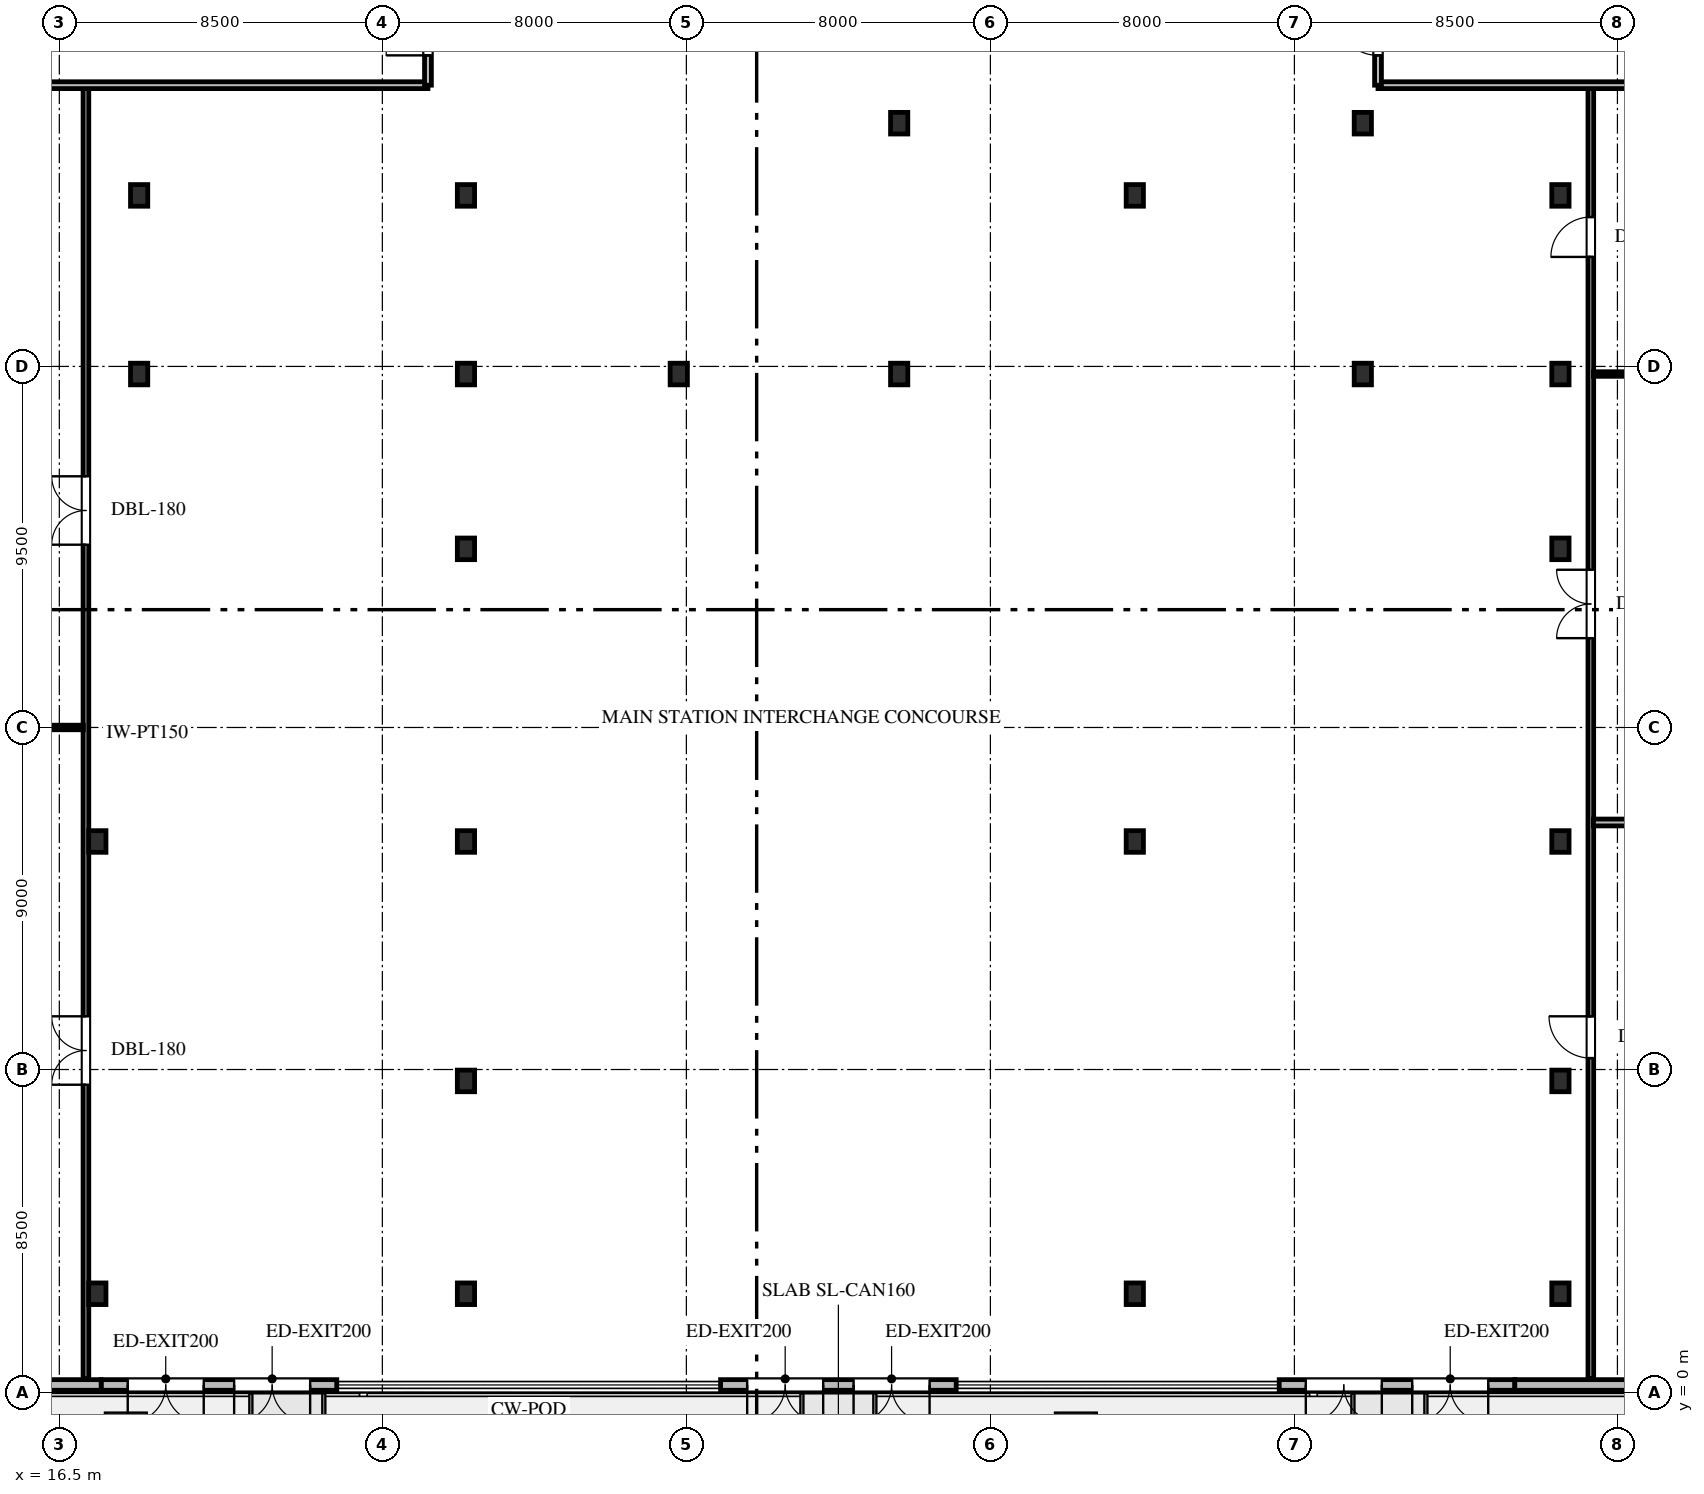
"""IFC4 building model, lengths in metres.
Left out: names, types, materials, properties, quantities, classifications, styles, units other than length and angle.
Written with IfcOpenShell. Run it as: python <this file> out.ifc"""

import sys

from ifc_helpers import new_model, si_unit, direction, frame, frame_2d, origin, origin_2d, place, context, subcontext, project, spatial, rectangle, i_section, extrude, element, fill, save


model = new_model("IFC4")
c1 = context("Model", 3, precision=1e-05, world=origin(), true_north=direction((0.0, 1.0)))
c2 = subcontext(c1, "Body", "Model", "MODEL_VIEW")
j1 = project(units=[si_unit("LENGTHUNIT", "METRE"), si_unit("PLANEANGLEUNIT", "RADIAN")], contexts=[c1])
p1 = place(None, origin())
s1 = spatial("IfcSite", under=j1, at=p1, CompositionType="ELEMENT")
p2 = place(p1, origin())
s2 = spatial("IfcBuilding", under=s1, at=p2, CompositionType="ELEMENT")
p3 = place(p2, origin())
s3 = spatial("IfcBuildingStorey", under=s2, at=p3, CompositionType="ELEMENT", Elevation=0.0)
for number, where, z_axis, x_axis in (
    (1, (17.5, 2.6, 0.0), (0.0, 0.0, 1.0), (1.0, 0.0, 0.0)),
    (2, (27.2, 2.6, 0.0), (0.0, 0.0, 1.0), (1.0, 0.0, 0.0)),
    (3, (44.8, 2.6, 0.0), (0.0, 0.0, 1.0), (1.0, 0.0, 0.0)),
    (4, (56.0, 2.6, 0.0), (0.0, 0.0, 1.0), (1.0, 0.0, 0.0)),
    (5, (27.2, 8.2, 0.0), (0.0, 0.0, 1.0), (1.0, 0.0, 0.0)),
    (6, (56.0, 8.2, 0.0), (0.0, 0.0, 1.0), (1.0, 0.0, 0.0)),
    (7, (17.5, 14.5, 0.0), (0.0, 0.0, 1.0), (1.0, 0.0, 0.0)),
    (8, (27.2, 14.5, 0.0), (0.0, 0.0, 1.0), (1.0, 0.0, 0.0)),
    (9, (44.8, 14.5, 0.0), (0.0, 0.0, 1.0), (1.0, 0.0, 0.0)),
    (10, (56.0, 14.5, 0.0), (0.0, 0.0, 1.0), (1.0, 0.0, 0.0)),
    (11, (27.2, 22.2, 0.0), (0.0, 0.0, 1.0), (1.0, 0.0, 0.0)),
    (12, (56.0, 22.2, 0.0), (0.0, 0.0, 1.0), (1.0, 0.0, 0.0)),
    (13, (18.6, 26.8, 0.0), (0.0, 0.0, 1.0), (1.0, 0.0, 0.0)),
    (14, (27.2, 26.8, 0.0), (0.0, 0.0, 1.0), (1.0, 0.0, 0.0)),
    (15, (32.8, 26.8, 0.0), (0.0, 0.0, 1.0), (1.0, 0.0, 0.0)),
    (16, (38.6, 26.8, 0.0), (0.0, 0.0, 1.0), (1.0, 0.0, 0.0)),
    (17, (50.8, 26.8, 0.0), (0.0, 0.0, 1.0), (1.0, 0.0, 0.0)),
    (18, (56.0, 26.8, 0.0), (0.0, 0.0, 1.0), (1.0, 0.0, 0.0)),
    (19, (18.6, 31.5, 0.0), (0.0, 0.0, 1.0), (1.0, 0.0, 0.0)),
    (20, (27.2, 31.5, 0.0), (0.0, 0.0, 1.0), (1.0, 0.0, 0.0)),
    (21, (44.8, 31.5, 0.0), (0.0, 0.0, 1.0), (1.0, 0.0, 0.0)),
    (22, (56.0, 31.5, 0.0), (0.0, 0.0, 1.0), (1.0, 0.0, 0.0)),
    (23, (38.6, 33.4, 0.0), (0.0, 0.0, 1.0), (1.0, 0.0, 0.0)),
    (24, (50.8, 33.4, 0.0), (0.0, 0.0, 1.0), (1.0, 0.0, 0.0)),
):
    element("IfcColumn", number, at=place(p3, frame(where, z_axis=z_axis, x_axis=x_axis)), inside=s3, PredefinedType="COLUMN", context=c2, shape_type="SweptSolid", body=[
        extrude(i_section(OverallWidth=0.454, OverallDepth=0.569, WebThickness=0.078, FlangeThickness=0.125, FilletRadius=0.03, at=origin_2d()), origin(), (0.0, 0.0, 1.0), 5.4),
    ])
p4 = place(p3, frame((23.8, 0.2, 0.0), z_axis=(0.0, 0.0, 1.0), x_axis=(-1.0, 0.0, 0.0)))
e25 = element("IfcWall", 25, at=p4, inside=s3, PredefinedType="STANDARD", context=c2, shape_type="SweptSolid", body=[
    extrude(rectangle(XDim=6.2, YDim=0.28, at=frame_2d((3.1, 0.0))), origin(), (0.0, 0.0, 1.0), 5.13),
])
p5 = place(p4, frame((0.7, 0.0, 0.0)))
e26 = element("IfcOpeningElement", 26, at=p5, cuts=e25, PredefinedType="OPENING", context=c2, shape_type="SweptSolid", body=[
    extrude(rectangle(XDim=2.0, YDim=2.4, at=frame_2d((1.0, 1.2))), frame((0.0, 0.15, 0.0), z_axis=(0.0, -1.0, 0.0), x_axis=(1.0, 0.0, 0.0)), (0.0, 0.0, 1.0), 0.3),
])
p6 = place(p4, frame((3.5, 0.0, 0.0)))
e27 = element("IfcOpeningElement", 27, at=p6, cuts=e25, PredefinedType="OPENING", context=c2, shape_type="SweptSolid", body=[
    extrude(rectangle(XDim=2.0, YDim=2.4, at=frame_2d((1.0, 1.2))), frame((0.0, 0.15, 0.0), z_axis=(0.0, -1.0, 0.0), x_axis=(1.0, 0.0, 0.0)), (0.0, 0.0, 1.0), 0.3),
])
p7 = place(p3, frame((40.1, 0.2, 0.0), z_axis=(0.0, 0.0, 1.0), x_axis=(-1.0, 0.0, 0.0)))
e28 = element("IfcWall", 28, at=p7, inside=s3, PredefinedType="STANDARD", context=c2, shape_type="SweptSolid", body=[
    extrude(rectangle(XDim=6.2, YDim=0.28, at=frame_2d((3.1, 0.0))), origin(), (0.0, 0.0, 1.0), 5.13),
])
p8 = place(p7, frame((0.7, 0.0, 0.0)))
e29 = element("IfcOpeningElement", 29, at=p8, cuts=e28, PredefinedType="OPENING", context=c2, shape_type="SweptSolid", body=[
    extrude(rectangle(XDim=2.0, YDim=2.4, at=frame_2d((1.0, 1.2))), frame((0.0, 0.15, 0.0), z_axis=(0.0, -1.0, 0.0), x_axis=(1.0, 0.0, 0.0)), (0.0, 0.0, 1.0), 0.3),
])
p9 = place(p7, frame((3.5, 0.0, 0.0)))
e30 = element("IfcOpeningElement", 30, at=p9, cuts=e28, PredefinedType="OPENING", context=c2, shape_type="SweptSolid", body=[
    extrude(rectangle(XDim=2.0, YDim=2.4, at=frame_2d((1.0, 1.2))), frame((0.0, 0.15, 0.0), z_axis=(0.0, -1.0, 0.0), x_axis=(1.0, 0.0, 0.0)), (0.0, 0.0, 1.0), 0.3),
])
p10 = place(p3, frame((54.8, 0.2, 0.0), z_axis=(0.0, 0.0, 1.0), x_axis=(-1.0, 0.0, 0.0)))
e31 = element("IfcWall", 31, at=p10, inside=s3, PredefinedType="STANDARD", context=c2, shape_type="SweptSolid", body=[
    extrude(rectangle(XDim=6.2, YDim=0.28, at=frame_2d((3.1, 0.0))), origin(), (0.0, 0.0, 1.0), 5.13),
])
p11 = place(p10, frame((0.7, 0.0, 0.0)))
e32 = element("IfcOpeningElement", 32, at=p11, cuts=e31, PredefinedType="OPENING", context=c2, shape_type="SweptSolid", body=[
    extrude(rectangle(XDim=2.0, YDim=2.4, at=frame_2d((1.0, 1.2))), frame((0.0, 0.15, 0.0), z_axis=(0.0, -1.0, 0.0), x_axis=(1.0, 0.0, 0.0)), (0.0, 0.0, 1.0), 0.3),
])
p12 = place(p10, frame((3.5, 0.0, 0.0)))
e33 = element("IfcOpeningElement", 33, at=p12, cuts=e31, PredefinedType="OPENING", context=c2, shape_type="SweptSolid", body=[
    extrude(rectangle(XDim=2.0, YDim=2.4, at=frame_2d((1.0, 1.2))), frame((0.0, 0.15, 0.0), z_axis=(0.0, -1.0, 0.0), x_axis=(1.0, 0.0, 0.0)), (0.0, 0.0, 1.0), 0.3),
])
p13 = place(p3, frame((17.6, 0.2, 0.0), z_axis=(0.0, 0.0, 1.0), x_axis=(-1.0, 0.0, 0.0)))
e34 = element("IfcWall", 34, at=p13, inside=s3, PredefinedType="STANDARD", context=c2, shape_type="SweptSolid", body=[
    extrude(rectangle(XDim=1.6, YDim=0.28, at=frame_2d((0.8, 0.0))), origin(), (0.0, 0.0, 1.0), 5.13),
])
p14 = place(p3, frame((57.8, 0.2, 0.0), z_axis=(0.0, 0.0, 1.0), x_axis=(-1.0, 0.0, 0.0)))
e35 = element("IfcWall", 35, at=p14, inside=s3, PredefinedType="STANDARD", context=c2, shape_type="SweptSolid", body=[
    extrude(rectangle(XDim=3.0, YDim=0.28, at=frame_2d((1.5, 0.0))), origin(), (0.0, 0.0, 1.0), 5.13),
])
p15 = place(p3, frame((17.2, 0.365, 0.0), z_axis=(0.0, 0.0, 1.0), x_axis=(0.0, 1.0, 0.0)))
e36 = element("IfcWall", 36, at=p15, inside=s3, PredefinedType="PARTITIONING", context=c2, shape_type="SweptSolid", body=[
    extrude(rectangle(XDim=33.967, YDim=0.15, at=frame_2d((16.983, 0.0))), origin(), (0.0, 0.0, 1.0), 4.182),
])
p16 = place(p15, frame((7.735, 0.0, 0.0)))
e37 = element("IfcOpeningElement", 37, at=p16, cuts=e36, PredefinedType="OPENING", context=c2, shape_type="SweptSolid", body=[
    extrude(rectangle(XDim=1.8, YDim=2.2, at=frame_2d((0.9, 1.1))), frame((0.0, 0.085, 0.0), z_axis=(0.0, -1.0, 0.0), x_axis=(1.0, 0.0, 0.0)), (0.0, 0.0, 1.0), 0.17),
])
p17 = place(p15, frame((21.944, 0.0, 0.0)))
e38 = element("IfcOpeningElement", 38, at=p17, cuts=e36, PredefinedType="OPENING", context=c2, shape_type="SweptSolid", body=[
    extrude(rectangle(XDim=1.8, YDim=2.2, at=frame_2d((0.9, 1.1))), frame((0.0, 0.085, 0.0), z_axis=(0.0, -1.0, 0.0), x_axis=(1.0, 0.0, 0.0)), (0.0, 0.0, 1.0), 0.17),
])
p18 = place(p3, frame((56.8, 0.365, 0.0), z_axis=(0.0, 0.0, 1.0), x_axis=(0.0, 1.0, 0.0)))
e39 = element("IfcWall", 39, at=p18, inside=s3, PredefinedType="PARTITIONING", context=c2, shape_type="SweptSolid", body=[
    extrude(rectangle(XDim=33.967, YDim=0.15, at=frame_2d((16.983, 0.0))), origin(), (0.0, 0.0, 1.0), 4.182),
])
p19 = place(p18, frame((8.435, 0.0, 0.0)))
e40 = element("IfcOpeningElement", 40, at=p19, cuts=e39, PredefinedType="OPENING", context=c2, shape_type="SweptSolid", body=[
    extrude(rectangle(XDim=1.1, YDim=2.2, at=frame_2d((0.55, 1.1))), frame((0.0, 0.085, 0.0), z_axis=(0.0, -1.0, 0.0), x_axis=(1.0, 0.0, 0.0)), (0.0, 0.0, 1.0), 0.17),
])
p20 = place(p18, frame((19.485, 0.0, 0.0)))
e41 = element("IfcOpeningElement", 41, at=p20, cuts=e39, PredefinedType="OPENING", context=c2, shape_type="SweptSolid", body=[
    extrude(rectangle(XDim=1.8, YDim=2.2, at=frame_2d((0.9, 1.1))), frame((0.0, 0.085, 0.0), z_axis=(0.0, -1.0, 0.0), x_axis=(1.0, 0.0, 0.0)), (0.0, 0.0, 1.0), 0.17),
])
p21 = place(p18, frame((29.516, 0.0, 0.0)))
e42 = element("IfcOpeningElement", 42, at=p21, cuts=e39, PredefinedType="OPENING", context=c2, shape_type="SweptSolid", body=[
    extrude(rectangle(XDim=1.05, YDim=2.2, at=frame_2d((0.525, 1.1))), frame((0.0, 0.085, 0.0), z_axis=(0.0, -1.0, 0.0), x_axis=(1.0, 0.0, 0.0)), (0.0, 0.0, 1.0), 0.17),
])
p22 = place(p3, frame((8.0, 17.5, 0.0), z_axis=(0.0, 0.0, 1.0), x_axis=(1.0, 0.0, 0.0)))
e43 = element("IfcWall", 43, at=p22, inside=s3, PredefinedType="PARTITIONING", context=c2, shape_type="SweptSolid", body=[
    extrude(rectangle(XDim=9.132, YDim=0.12, at=frame_2d((4.566, 0.0))), origin(), (0.0, 0.0, 1.0), 4.182),
])
p23 = place(p3, frame((56.868, 15.0, 0.0), z_axis=(0.0, 0.0, 1.0), x_axis=(1.0, 0.0, 0.0)))
e44 = element("IfcWall", 44, at=p23, inside=s3, PredefinedType="STANDARD", context=c2, shape_type="SweptSolid", body=[
    extrude(rectangle(XDim=16.932, YDim=0.18, at=frame_2d((8.466, 0.0))), origin(), (0.0, 0.0, 1.0), 4.182),
])
p24 = place(p3, frame((56.868, 26.8, 0.0), z_axis=(0.0, 0.0, 1.0), x_axis=(1.0, 0.0, 0.0)))
e45 = element("IfcWall", 45, at=p24, inside=s3, PredefinedType="PARTITIONING", context=c2, shape_type="SweptSolid", body=[
    extrude(rectangle(XDim=16.932, YDim=0.12, at=frame_2d((8.466, 0.0))), origin(), (0.0, 0.0, 1.0), 4.182),
])
p25 = place(p3, frame((51.2, 34.4, 0.0), z_axis=(0.0, 0.0, 1.0), x_axis=(1.0, 0.0, 0.0)))
e46 = element("IfcWall", 46, at=p25, inside=s3, PredefinedType="STANDARD", context=c2, shape_type="SweptSolid", body=[
    extrude(rectangle(XDim=22.435, YDim=0.18, at=frame_2d((11.218, 0.0))), origin(), (0.0, 0.0, 1.0), 4.182),
])
p26 = place(p3, frame((51.2, 34.4, 0.0), z_axis=(0.0, 0.0, 1.0), x_axis=(0.0, 1.0, 0.0)))
e47 = element("IfcWall", 47, at=p26, inside=s3, PredefinedType="STANDARD", context=c2, shape_type="SweptSolid", body=[
    extrude(rectangle(XDim=3.167, YDim=0.18, at=frame_2d((1.583, 0.0))), origin(), (0.0, 0.0, 1.0), 4.823),
])
p27 = place(p26, frame((0.785, 0.0, 0.0)))
e48 = element("IfcOpeningElement", 48, at=p27, cuts=e47, PredefinedType="OPENING", context=c2, shape_type="SweptSolid", body=[
    extrude(rectangle(XDim=1.1, YDim=2.2, at=frame_2d((0.55, 1.1))), frame((0.0, 0.1, 0.0), z_axis=(0.0, -1.0, 0.0), x_axis=(1.0, 0.0, 0.0)), (0.0, 0.0, 1.0), 0.2),
])
p28 = place(p3, frame((8.0, 34.4, 0.0), z_axis=(0.0, 0.0, 1.0), x_axis=(1.0, 0.0, 0.0)))
e49 = element("IfcWall", 49, at=p28, inside=s3, PredefinedType="STANDARD", context=c2, shape_type="SweptSolid", body=[
    extrude(rectangle(XDim=18.2, YDim=0.18, at=frame_2d((9.1, 0.0))), origin(), (0.0, 0.0, 1.0), 4.182),
])
p29 = place(p3, frame((26.2, 34.4, 0.0), z_axis=(0.0, 0.0, 1.0), x_axis=(0.0, 1.0, 0.0)))
e50 = element("IfcWall", 50, at=p29, inside=s3, PredefinedType="STANDARD", context=c2, shape_type="SweptSolid", body=[
    extrude(rectangle(XDim=3.167, YDim=0.18, at=frame_2d((1.583, 0.0))), origin(), (0.0, 0.0, 1.0), 4.182),
])
p30 = place(p29, frame((0.785, 0.0, 0.0)))
e51 = element("IfcOpeningElement", 51, at=p30, cuts=e50, PredefinedType="OPENING", context=c2, shape_type="SweptSolid", body=[
    extrude(rectangle(XDim=1.1, YDim=2.2, at=frame_2d((0.55, 1.1))), frame((0.0, 0.1, 0.0), z_axis=(0.0, -1.0, 0.0), x_axis=(1.0, 0.0, 0.0)), (0.0, 0.0, 1.0), 0.2),
])
p31 = place(p3, frame((0.0, 0.0, 4.6)))
p32 = place(p31, frame((18.25, -1.08, 0.0)))
p33 = place(p32, frame((0.0, 0.0, 0.11)))
e52 = element("IfcDoor", 52, at=p33, inside=s3, OperationType="SINGLE_SWING_LEFT", PredefinedType="TRAPDOOR", context=c2, shape_type="SweptSolid", body=[
    extrude(rectangle(XDim=1.1, YDim=1.1, at=origin_2d()), origin(), (0.0, 0.0, 1.0), 0.05),
])
p34 = place(p31, frame((43.25, -1.08, 0.0)))
p35 = place(p34, frame((0.0, 0.0, 0.11)))
e53 = element("IfcDoor", 53, at=p35, inside=s3, OperationType="SINGLE_SWING_LEFT", PredefinedType="TRAPDOOR", context=c2, shape_type="SweptSolid", body=[
    extrude(rectangle(XDim=1.1, YDim=1.1, at=origin_2d()), origin(), (0.0, 0.0, 1.0), 0.05),
])
p36 = place(p5, origin())
e54 = element("IfcDoor", 54, at=p36, inside=s3, OperationType="DOUBLE_DOOR_SINGLE_SWING", PredefinedType="DOOR", context=c2, shape_type="SweptSolid", body=[
    extrude(rectangle(XDim=2.0, YDim=2.4, at=frame_2d((1.0, 1.2))), frame((0.0, 0.025, 0.0), z_axis=(0.0, -1.0, 0.0), x_axis=(1.0, 0.0, 0.0)), (0.0, 0.0, 1.0), 0.05),
])
fill(e26, e54)
p37 = place(p6, origin())
e55 = element("IfcDoor", 55, at=p37, inside=s3, OperationType="DOUBLE_DOOR_SINGLE_SWING", PredefinedType="DOOR", context=c2, shape_type="SweptSolid", body=[
    extrude(rectangle(XDim=2.0, YDim=2.4, at=frame_2d((1.0, 1.2))), frame((0.0, 0.025, 0.0), z_axis=(0.0, -1.0, 0.0), x_axis=(1.0, 0.0, 0.0)), (0.0, 0.0, 1.0), 0.05),
])
fill(e27, e55)
p38 = place(p8, origin())
e56 = element("IfcDoor", 56, at=p38, inside=s3, OperationType="DOUBLE_DOOR_SINGLE_SWING", PredefinedType="DOOR", context=c2, shape_type="SweptSolid", body=[
    extrude(rectangle(XDim=2.0, YDim=2.4, at=frame_2d((1.0, 1.2))), frame((0.0, 0.025, 0.0), z_axis=(0.0, -1.0, 0.0), x_axis=(1.0, 0.0, 0.0)), (0.0, 0.0, 1.0), 0.05),
])
fill(e29, e56)
p39 = place(p9, origin())
e57 = element("IfcDoor", 57, at=p39, inside=s3, OperationType="DOUBLE_DOOR_SINGLE_SWING", PredefinedType="DOOR", context=c2, shape_type="SweptSolid", body=[
    extrude(rectangle(XDim=2.0, YDim=2.4, at=frame_2d((1.0, 1.2))), frame((0.0, 0.025, 0.0), z_axis=(0.0, -1.0, 0.0), x_axis=(1.0, 0.0, 0.0)), (0.0, 0.0, 1.0), 0.05),
])
fill(e30, e57)
p40 = place(p11, origin())
e58 = element("IfcDoor", 58, at=p40, inside=s3, OperationType="DOUBLE_DOOR_SINGLE_SWING", PredefinedType="DOOR", context=c2, shape_type="SweptSolid", body=[
    extrude(rectangle(XDim=2.0, YDim=2.4, at=frame_2d((1.0, 1.2))), frame((0.0, 0.025, 0.0), z_axis=(0.0, -1.0, 0.0), x_axis=(1.0, 0.0, 0.0)), (0.0, 0.0, 1.0), 0.05),
])
fill(e32, e58)
p41 = place(p12, origin())
e59 = element("IfcDoor", 59, at=p41, inside=s3, OperationType="DOUBLE_DOOR_SINGLE_SWING", PredefinedType="DOOR", context=c2, shape_type="SweptSolid", body=[
    extrude(rectangle(XDim=2.0, YDim=2.4, at=frame_2d((1.0, 1.2))), frame((0.0, 0.025, 0.0), z_axis=(0.0, -1.0, 0.0), x_axis=(1.0, 0.0, 0.0)), (0.0, 0.0, 1.0), 0.05),
])
fill(e33, e59)
p42 = place(p27, origin())
e60 = element("IfcDoor", 60, at=p42, inside=s3, OperationType="SINGLE_SWING_RIGHT", PredefinedType="DOOR", context=c2, shape_type="SweptSolid", body=[
    extrude(rectangle(XDim=1.1, YDim=2.2, at=frame_2d((0.55, 1.1))), frame((0.0, 0.025, 0.0), z_axis=(0.0, -1.0, 0.0), x_axis=(1.0, 0.0, 0.0)), (0.0, 0.0, 1.0), 0.05),
])
fill(e48, e60)
p43 = place(p30, origin())
e61 = element("IfcDoor", 61, at=p43, inside=s3, OperationType="SINGLE_SWING_LEFT", PredefinedType="DOOR", context=c2, shape_type="SweptSolid", body=[
    extrude(rectangle(XDim=1.1, YDim=2.2, at=frame_2d((0.55, 1.1))), frame((0.0, 0.025, 0.0), z_axis=(0.0, -1.0, 0.0), x_axis=(1.0, 0.0, 0.0)), (0.0, 0.0, 1.0), 0.05),
])
fill(e51, e61)
p44 = place(p16, origin())
e62 = element("IfcDoor", 62, at=p44, inside=s3, OperationType="DOUBLE_DOOR_SINGLE_SWING", PredefinedType="DOOR", context=c2, shape_type="SweptSolid", body=[
    extrude(rectangle(XDim=1.8, YDim=2.2, at=frame_2d((0.9, 1.1))), frame((0.0, 0.025, 0.0), z_axis=(0.0, -1.0, 0.0), x_axis=(1.0, 0.0, 0.0)), (0.0, 0.0, 1.0), 0.05),
])
fill(e37, e62)
p45 = place(p17, origin())
e63 = element("IfcDoor", 63, at=p45, inside=s3, OperationType="DOUBLE_DOOR_SINGLE_SWING", PredefinedType="DOOR", context=c2, shape_type="SweptSolid", body=[
    extrude(rectangle(XDim=1.8, YDim=2.2, at=frame_2d((0.9, 1.1))), frame((0.0, 0.025, 0.0), z_axis=(0.0, -1.0, 0.0), x_axis=(1.0, 0.0, 0.0)), (0.0, 0.0, 1.0), 0.05),
])
fill(e38, e63)
p46 = place(p19, origin())
e64 = element("IfcDoor", 64, at=p46, inside=s3, OperationType="SINGLE_SWING_RIGHT", PredefinedType="DOOR", context=c2, shape_type="SweptSolid", body=[
    extrude(rectangle(XDim=1.1, YDim=2.2, at=frame_2d((0.55, 1.1))), frame((0.0, 0.025, 0.0), z_axis=(0.0, -1.0, 0.0), x_axis=(1.0, 0.0, 0.0)), (0.0, 0.0, 1.0), 0.05),
])
fill(e40, e64)
p47 = place(p20, origin())
e65 = element("IfcDoor", 65, at=p47, inside=s3, OperationType="DOUBLE_DOOR_SINGLE_SWING", PredefinedType="DOOR", context=c2, shape_type="SweptSolid", body=[
    extrude(rectangle(XDim=1.8, YDim=2.2, at=frame_2d((0.9, 1.1))), frame((0.0, 0.025, 0.0), z_axis=(0.0, -1.0, 0.0), x_axis=(1.0, 0.0, 0.0)), (0.0, 0.0, 1.0), 0.05),
])
fill(e41, e65)
p48 = place(p21, origin())
e66 = element("IfcDoor", 66, at=p48, inside=s3, OperationType="SINGLE_SWING_LEFT", PredefinedType="DOOR", context=c2, shape_type="SweptSolid", body=[
    extrude(rectangle(XDim=1.05, YDim=2.2, at=frame_2d((0.525, 1.1))), frame((0.0, 0.025, 0.0), z_axis=(0.0, -1.0, 0.0), x_axis=(1.0, 0.0, 0.0)), (0.0, 0.0, 1.0), 0.05),
])
fill(e42, e66)
save(model, sys.argv[1])
